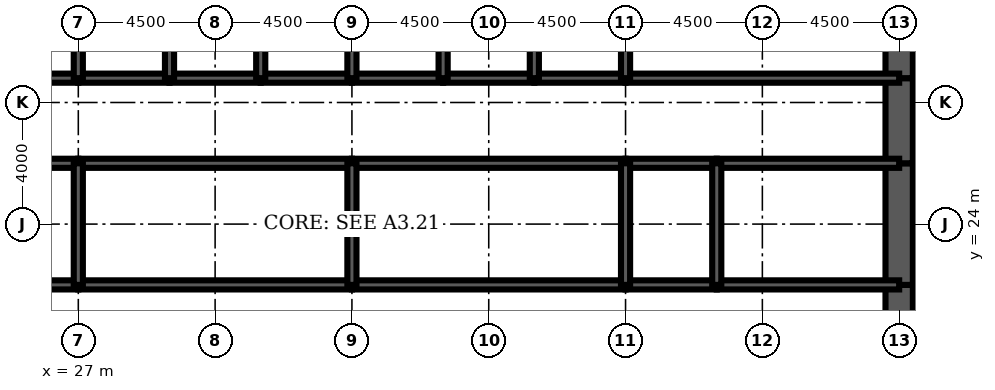
"""IFC4 building model, lengths in metres.
Left out: names, types, materials, properties, quantities, classifications, styles, units other than length and angle.
Written with IfcOpenShell. Run it as: python <this file> out.ifc"""

import sys

from ifc_helpers import new_model, si_unit, direction, frame, frame_2d, origin, place, context, subcontext, project, spatial, rectangle, extrude, element, fill, save


model = new_model("IFC4")
c1 = context("Model", 3, precision=1e-05, world=origin(), true_north=direction((0.0, 1.0)))
c2 = subcontext(c1, "Body", "Model", "MODEL_VIEW")
j1 = project(units=[si_unit("LENGTHUNIT", "METRE"), si_unit("PLANEANGLEUNIT", "RADIAN")], contexts=[c1])
p1 = place(None, origin())
s1 = spatial("IfcSite", under=j1, at=p1, CompositionType="ELEMENT")
p2 = place(p1, origin())
s2 = spatial("IfcBuilding", under=s1, at=p2, CompositionType="ELEMENT")
p3 = place(p2, frame((0.0, 0.0, 90.5)))
s3 = spatial("IfcBuildingStorey", under=s2, at=p3, CompositionType="ELEMENT", Elevation=90.5)
p4 = place(p3, frame((54.0, 19.2, 0.0), z_axis=(0.0, 0.0, 1.0), x_axis=(0.0, 1.0, 0.0)))
e1 = element("IfcWall", 1, at=p4, inside=s3, PredefinedType="SHEAR", context=c2, shape_type="SweptSolid", body=[
    extrude(rectangle(XDim=2.8, YDim=0.9, at=frame_2d((1.4, 0.0))), origin(), (0.0, 0.0, 1.0), 4.5),
])
p5 = place(p4, frame((0.4, 0.0, 0.0)))
e2 = element("IfcOpeningElement", 2, at=p5, cuts=e1, PredefinedType="OPENING", context=c2, shape_type="SweptSolid", body=[
    extrude(rectangle(XDim=1.8, YDim=2.1, at=frame_2d((0.9, 1.05))), frame((0.0, 0.46, 0.0), z_axis=(0.0, -1.0, 0.0), x_axis=(1.0, 0.0, 0.0)), (0.0, 0.0, 1.0), 0.92),
])
p6 = place(p3, frame((54.0, 22.0, 0.0), z_axis=(0.0, 0.0, 1.0), x_axis=(0.0, 1.0, 0.0)))
e3 = element("IfcWall", 3, at=p6, inside=s3, PredefinedType="SHEAR", context=c2, shape_type="SweptSolid", body=[
    extrude(rectangle(XDim=4.0, YDim=0.9, at=frame_2d((2.0, 0.0))), origin(), (0.0, 0.0, 1.0), 4.5),
])
p7 = place(p3, frame((54.0, 26.0, 0.0), z_axis=(0.0, 0.0, 1.0), x_axis=(0.0, 1.0, 0.0)))
e4 = element("IfcWall", 4, at=p7, inside=s3, PredefinedType="SHEAR", context=c2, shape_type="SweptSolid", body=[
    extrude(rectangle(XDim=2.8, YDim=0.9, at=frame_2d((1.4, 0.0))), origin(), (0.0, 0.0, 1.0), 4.5),
])
p8 = place(p7, frame((0.6, 0.0, 0.0)))
e5 = element("IfcOpeningElement", 5, at=p8, cuts=e4, PredefinedType="OPENING", context=c2, shape_type="SweptSolid", body=[
    extrude(rectangle(XDim=1.8, YDim=2.1, at=frame_2d((0.9, 1.05))), frame((0.0, 0.46, 0.0), z_axis=(0.0, -1.0, 0.0), x_axis=(1.0, 0.0, 0.0)), (0.0, 0.0, 1.0), 0.92),
])
p9 = place(p3, frame((54.0, 28.8, 0.0), z_axis=(0.0, 0.0, 1.0), x_axis=(0.0, 1.0, 0.0)))
e6 = element("IfcWall", 6, at=p9, inside=s3, PredefinedType="SHEAR", context=c2, shape_type="SweptSolid", body=[
    extrude(rectangle(XDim=3.2, YDim=0.9, at=frame_2d((1.6, 0.0))), origin(), (0.0, 0.0, 1.0), 4.5),
])
p10 = place(p3, frame((18.0, 28.8, 0.0), z_axis=(0.0, 0.0, 1.0), x_axis=(1.0, 0.0, 0.0)))
e7 = element("IfcWall", 7, at=p10, inside=s3, PredefinedType="SOLIDWALL", context=c2, shape_type="SweptSolid", body=[
    extrude(rectangle(XDim=9.0, YDim=0.3, at=frame_2d((4.5, 0.0))), origin(), (0.0, 0.0, 1.0), 4.5),
])
p11 = place(p10, frame((0.65, 0.0, 0.0)))
e8 = element("IfcOpeningElement", 8, at=p11, cuts=e7, PredefinedType="OPENING", context=c2, shape_type="SweptSolid", body=[
    extrude(rectangle(XDim=1.0, YDim=2.1, at=frame_2d((0.5, 1.05))), frame((0.0, 0.16, 0.0), z_axis=(0.0, -1.0, 0.0), x_axis=(1.0, 0.0, 0.0)), (0.0, 0.0, 1.0), 0.32),
])
p12 = place(p3, frame((27.0, 28.8, 0.0), z_axis=(0.0, 0.0, 1.0), x_axis=(1.0, 0.0, 0.0)))
e9 = element("IfcWall", 9, at=p12, inside=s3, PredefinedType="SOLIDWALL", context=c2, shape_type="SweptSolid", body=[
    extrude(rectangle(XDim=3.0, YDim=0.3, at=frame_2d((1.5, 0.0))), origin(), (0.0, 0.0, 1.0), 4.5),
])
p13 = place(p12, frame((0.95, 0.0, 0.0)))
e10 = element("IfcOpeningElement", 10, at=p13, cuts=e9, PredefinedType="OPENING", context=c2, shape_type="SweptSolid", body=[
    extrude(rectangle(XDim=1.1, YDim=2.2, at=frame_2d((0.55, 1.1))), frame((0.0, 0.16, 0.0), z_axis=(0.0, -1.0, 0.0), x_axis=(1.0, 0.0, 0.0)), (0.0, 0.0, 1.0), 0.32),
])
p14 = place(p3, frame((30.0, 28.8, 0.0), z_axis=(0.0, 0.0, 1.0), x_axis=(1.0, 0.0, 0.0)))
e11 = element("IfcWall", 11, at=p14, inside=s3, PredefinedType="SOLIDWALL", context=c2, shape_type="SweptSolid", body=[
    extrude(rectangle(XDim=3.0, YDim=0.3, at=frame_2d((1.5, 0.0))), origin(), (0.0, 0.0, 1.0), 4.5),
])
p15 = place(p14, frame((0.95, 0.0, 0.0)))
e12 = element("IfcOpeningElement", 12, at=p15, cuts=e11, PredefinedType="OPENING", context=c2, shape_type="SweptSolid", body=[
    extrude(rectangle(XDim=1.1, YDim=2.2, at=frame_2d((0.55, 1.1))), frame((0.0, 0.16, 0.0), z_axis=(0.0, -1.0, 0.0), x_axis=(1.0, 0.0, 0.0)), (0.0, 0.0, 1.0), 0.32),
])
p16 = place(p3, frame((33.0, 28.8, 0.0), z_axis=(0.0, 0.0, 1.0), x_axis=(1.0, 0.0, 0.0)))
e13 = element("IfcWall", 13, at=p16, inside=s3, PredefinedType="SOLIDWALL", context=c2, shape_type="SweptSolid", body=[
    extrude(rectangle(XDim=3.0, YDim=0.3, at=frame_2d((1.5, 0.0))), origin(), (0.0, 0.0, 1.0), 4.5),
])
p17 = place(p16, frame((0.95, 0.0, 0.0)))
e14 = element("IfcOpeningElement", 14, at=p17, cuts=e13, PredefinedType="OPENING", context=c2, shape_type="SweptSolid", body=[
    extrude(rectangle(XDim=1.1, YDim=2.2, at=frame_2d((0.55, 1.1))), frame((0.0, 0.16, 0.0), z_axis=(0.0, -1.0, 0.0), x_axis=(1.0, 0.0, 0.0)), (0.0, 0.0, 1.0), 0.32),
])
for number, where, z_axis, x_axis in (
    (15, (36.0, 28.8, 0.0), (0.0, 0.0, 1.0), (1.0, 0.0, 0.0)),
    (16, (39.0, 28.8, 0.0), (0.0, 0.0, 1.0), (1.0, 0.0, 0.0)),
):
    element("IfcWall", number, at=place(p3, frame(where, z_axis=z_axis, x_axis=x_axis)), inside=s3, PredefinedType="SOLIDWALL", context=c2, shape_type="SweptSolid", body=[
        extrude(rectangle(XDim=3.0, YDim=0.3, at=frame_2d((1.5, 0.0))), origin(), (0.0, 0.0, 1.0), 4.5),
    ])
p18 = place(p3, frame((42.0, 28.8, 0.0), z_axis=(0.0, 0.0, 1.0), x_axis=(1.0, 0.0, 0.0)))
e17 = element("IfcWall", 17, at=p18, inside=s3, PredefinedType="SOLIDWALL", context=c2, shape_type="SweptSolid", body=[
    extrude(rectangle(XDim=3.0, YDim=0.3, at=frame_2d((1.5, 0.0))), origin(), (0.0, 0.0, 1.0), 4.5),
])
p19 = place(p18, frame((0.95, 0.0, 0.0)))
e18 = element("IfcOpeningElement", 18, at=p19, cuts=e17, PredefinedType="OPENING", context=c2, shape_type="SweptSolid", body=[
    extrude(rectangle(XDim=1.1, YDim=2.2, at=frame_2d((0.55, 1.1))), frame((0.0, 0.16, 0.0), z_axis=(0.0, -1.0, 0.0), x_axis=(1.0, 0.0, 0.0)), (0.0, 0.0, 1.0), 0.32),
])
p20 = place(p3, frame((45.0, 28.8, 0.0), z_axis=(0.0, 0.0, 1.0), x_axis=(1.0, 0.0, 0.0)))
e19 = element("IfcWall", 19, at=p20, inside=s3, PredefinedType="SOLIDWALL", context=c2, shape_type="SweptSolid", body=[
    extrude(rectangle(XDim=9.0, YDim=0.3, at=frame_2d((4.5, 0.0))), origin(), (0.0, 0.0, 1.0), 4.5),
])
p21 = place(p20, frame((7.35, 0.0, 0.0)))
e20 = element("IfcOpeningElement", 20, at=p21, cuts=e19, PredefinedType="OPENING", context=c2, shape_type="SweptSolid", body=[
    extrude(rectangle(XDim=1.0, YDim=2.1, at=frame_2d((0.5, 1.05))), frame((0.0, 0.16, 0.0), z_axis=(0.0, -1.0, 0.0), x_axis=(1.0, 0.0, 0.0)), (0.0, 0.0, 1.0), 0.32),
])
p22 = place(p3, frame((24.0, 22.0, 0.0), z_axis=(0.0, 0.0, 1.0), x_axis=(1.0, 0.0, 0.0)))
e21 = element("IfcWall", 21, at=p22, inside=s3, PredefinedType="SOLIDWALL", context=c2, shape_type="SweptSolid", body=[
    extrude(rectangle(XDim=3.0, YDim=0.3, at=frame_2d((1.5, 0.0))), origin(), (0.0, 0.0, 1.0), 4.5),
])
p23 = place(p22, frame((1.0, 0.0, 0.0)))
e22 = element("IfcOpeningElement", 22, at=p23, cuts=e21, PredefinedType="OPENING", context=c2, shape_type="SweptSolid", body=[
    extrude(rectangle(XDim=1.0, YDim=2.1, at=frame_2d((0.5, 1.05))), frame((0.0, 0.16, 0.0), z_axis=(0.0, -1.0, 0.0), x_axis=(1.0, 0.0, 0.0)), (0.0, 0.0, 1.0), 0.32),
])
p24 = place(p3, frame((27.0, 22.0, 0.0), z_axis=(0.0, 0.0, 1.0), x_axis=(1.0, 0.0, 0.0)))
e23 = element("IfcWall", 23, at=p24, inside=s3, PredefinedType="SOLIDWALL", context=c2, shape_type="SweptSolid", body=[
    extrude(rectangle(XDim=9.0, YDim=0.3, at=frame_2d((4.5, 0.0))), origin(), (0.0, 0.0, 1.0), 4.5),
])
p25 = place(p24, frame((4.0, 0.0, 0.0)))
e24 = element("IfcOpeningElement", 24, at=p25, cuts=e23, PredefinedType="OPENING", context=c2, shape_type="SweptSolid", body=[
    extrude(rectangle(XDim=1.0, YDim=2.1, at=frame_2d((0.5, 1.05))), frame((0.0, 0.16, 0.0), z_axis=(0.0, -1.0, 0.0), x_axis=(1.0, 0.0, 0.0)), (0.0, 0.0, 1.0), 0.32),
])
p26 = place(p3, frame((36.0, 22.0, 0.0), z_axis=(0.0, 0.0, 1.0), x_axis=(1.0, 0.0, 0.0)))
e25 = element("IfcWall", 25, at=p26, inside=s3, PredefinedType="SOLIDWALL", context=c2, shape_type="SweptSolid", body=[
    extrude(rectangle(XDim=9.0, YDim=0.3, at=frame_2d((4.5, 0.0))), origin(), (0.0, 0.0, 1.0), 4.5),
])
p27 = place(p26, frame((4.0, 0.0, 0.0)))
e26 = element("IfcOpeningElement", 26, at=p27, cuts=e25, PredefinedType="OPENING", context=c2, shape_type="SweptSolid", body=[
    extrude(rectangle(XDim=1.0, YDim=2.1, at=frame_2d((0.5, 1.05))), frame((0.0, 0.16, 0.0), z_axis=(0.0, -1.0, 0.0), x_axis=(1.0, 0.0, 0.0)), (0.0, 0.0, 1.0), 0.32),
])
p28 = place(p3, frame((45.0, 22.0, 0.0), z_axis=(0.0, 0.0, 1.0), x_axis=(1.0, 0.0, 0.0)))
e27 = element("IfcWall", 27, at=p28, inside=s3, PredefinedType="SOLIDWALL", context=c2, shape_type="SweptSolid", body=[
    extrude(rectangle(XDim=3.0, YDim=0.3, at=frame_2d((1.5, 0.0))), origin(), (0.0, 0.0, 1.0), 4.5),
])
p29 = place(p28, frame((1.0, 0.0, 0.0)))
e28 = element("IfcOpeningElement", 28, at=p29, cuts=e27, PredefinedType="OPENING", context=c2, shape_type="SweptSolid", body=[
    extrude(rectangle(XDim=1.0, YDim=2.1, at=frame_2d((0.5, 1.05))), frame((0.0, 0.16, 0.0), z_axis=(0.0, -1.0, 0.0), x_axis=(1.0, 0.0, 0.0)), (0.0, 0.0, 1.0), 0.32),
])
p30 = place(p3, frame((48.0, 22.0, 0.0), z_axis=(0.0, 0.0, 1.0), x_axis=(1.0, 0.0, 0.0)))
e29 = element("IfcWall", 29, at=p30, inside=s3, PredefinedType="SOLIDWALL", context=c2, shape_type="SweptSolid", body=[
    extrude(rectangle(XDim=6.0, YDim=0.3, at=frame_2d((3.0, 0.0))), origin(), (0.0, 0.0, 1.0), 4.5),
])
p31 = place(p30, frame((2.0, 0.0, 0.0)))
e30 = element("IfcOpeningElement", 30, at=p31, cuts=e29, PredefinedType="OPENING", context=c2, shape_type="SweptSolid", body=[
    extrude(rectangle(XDim=1.0, YDim=2.1, at=frame_2d((0.5, 1.05))), frame((0.0, 0.16, 0.0), z_axis=(0.0, -1.0, 0.0), x_axis=(1.0, 0.0, 0.0)), (0.0, 0.0, 1.0), 0.32),
])
p32 = place(p30, frame((4.0, 0.0, 0.0)))
e31 = element("IfcOpeningElement", 31, at=p32, cuts=e29, PredefinedType="OPENING", context=c2, shape_type="SweptSolid", body=[
    extrude(rectangle(XDim=1.0, YDim=2.1, at=frame_2d((0.5, 1.05))), frame((0.0, 0.16, 0.0), z_axis=(0.0, -1.0, 0.0), x_axis=(1.0, 0.0, 0.0)), (0.0, 0.0, 1.0), 0.32),
])
p33 = place(p3, frame((24.0, 26.0, 0.0), z_axis=(0.0, 0.0, 1.0), x_axis=(1.0, 0.0, 0.0)))
e32 = element("IfcWall", 32, at=p33, inside=s3, PredefinedType="SOLIDWALL", context=c2, shape_type="SweptSolid", body=[
    extrude(rectangle(XDim=3.0, YDim=0.3, at=frame_2d((1.5, 0.0))), origin(), (0.0, 0.0, 1.0), 4.5),
])
for number, where, z_axis, x_axis in (
    (33, (27.0, 26.0, 0.0), (0.0, 0.0, 1.0), (1.0, 0.0, 0.0)),
    (34, (36.0, 26.0, 0.0), (0.0, 0.0, 1.0), (1.0, 0.0, 0.0)),
):
    element("IfcWall", number, at=place(p3, frame(where, z_axis=z_axis, x_axis=x_axis)), inside=s3, PredefinedType="SOLIDWALL", context=c2, shape_type="SweptSolid", body=[
        extrude(rectangle(XDim=9.0, YDim=0.3, at=frame_2d((4.5, 0.0))), origin(), (0.0, 0.0, 1.0), 4.5),
    ])
p34 = place(p3, frame((45.0, 26.0, 0.0), z_axis=(0.0, 0.0, 1.0), x_axis=(1.0, 0.0, 0.0)))
e35 = element("IfcWall", 35, at=p34, inside=s3, PredefinedType="SOLIDWALL", context=c2, shape_type="SweptSolid", body=[
    extrude(rectangle(XDim=3.0, YDim=0.3, at=frame_2d((1.5, 0.0))), origin(), (0.0, 0.0, 1.0), 4.5),
])
p35 = place(p3, frame((48.0, 26.0, 0.0), z_axis=(0.0, 0.0, 1.0), x_axis=(1.0, 0.0, 0.0)))
e36 = element("IfcWall", 36, at=p35, inside=s3, PredefinedType="SOLIDWALL", context=c2, shape_type="SweptSolid", body=[
    extrude(rectangle(XDim=6.0, YDim=0.3, at=frame_2d((3.0, 0.0))), origin(), (0.0, 0.0, 1.0), 4.5),
])
for number, where, z_axis, x_axis in (
    (37, (27.0, 28.8, 0.0), (0.0, 0.0, 1.0), (0.0, 1.0, 0.0)),
    (38, (30.0, 28.8, 0.0), (0.0, 0.0, 1.0), (0.0, 1.0, 0.0)),
    (39, (33.0, 28.8, 0.0), (0.0, 0.0, 1.0), (0.0, 1.0, 0.0)),
    (40, (36.0, 28.8, 0.0), (0.0, 0.0, 1.0), (0.0, 1.0, 0.0)),
    (41, (39.0, 28.8, 0.0), (0.0, 0.0, 1.0), (0.0, 1.0, 0.0)),
    (42, (42.0, 28.8, 0.0), (0.0, 0.0, 1.0), (0.0, 1.0, 0.0)),
    (43, (45.0, 28.8, 0.0), (0.0, 0.0, 1.0), (0.0, 1.0, 0.0)),
):
    element("IfcWall", number, at=place(p3, frame(where, z_axis=z_axis, x_axis=x_axis)), inside=s3, PredefinedType="SOLIDWALL", context=c2, shape_type="SweptSolid", body=[
        extrude(rectangle(XDim=3.2, YDim=0.3, at=frame_2d((1.6, 0.0))), origin(), (0.0, 0.0, 1.0), 4.5),
    ])
for number, where, z_axis, x_axis in (
    (44, (27.0, 22.0, 0.0), (0.0, 0.0, 1.0), (0.0, 1.0, 0.0)),
    (45, (36.0, 22.0, 0.0), (0.0, 0.0, 1.0), (0.0, 1.0, 0.0)),
    (46, (45.0, 22.0, 0.0), (0.0, 0.0, 1.0), (0.0, 1.0, 0.0)),
    (47, (48.0, 22.0, 0.0), (0.0, 0.0, 1.0), (0.0, 1.0, 0.0)),
):
    element("IfcWall", number, at=place(p3, frame(where, z_axis=z_axis, x_axis=x_axis)), inside=s3, PredefinedType="SOLIDWALL", context=c2, shape_type="SweptSolid", body=[
        extrude(rectangle(XDim=4.0, YDim=0.3, at=frame_2d((2.0, 0.0))), origin(), (0.0, 0.0, 1.0), 4.5),
    ])
p36 = place(p3, frame((38.5, 22.15, 0.0), z_axis=(0.0, 0.0, 1.0), x_axis=(0.0, 1.0, 0.0)))
e48 = element("IfcWall", 48, at=p36, inside=s3, PredefinedType="PARTITIONING", context=c2, shape_type="SweptSolid", body=[
    extrude(rectangle(XDim=3.7, YDim=0.15, at=frame_2d((1.85, 0.0))), origin(), (0.0, 0.0, 1.0), 3.0),
])
p37 = place(p36, frame((2.2, 0.0, 0.0)))
e49 = element("IfcOpeningElement", 49, at=p37, cuts=e48, PredefinedType="OPENING", context=c2, shape_type="SweptSolid", body=[
    extrude(rectangle(XDim=1.0, YDim=2.1, at=frame_2d((0.5, 1.05))), frame((0.0, 0.085, 0.0), z_axis=(0.0, -1.0, 0.0), x_axis=(1.0, 0.0, 0.0)), (0.0, 0.0, 1.0), 0.17),
])
p38 = place(p3, frame((51.375, 22.15, 0.0), z_axis=(0.0, 0.0, 1.0), x_axis=(0.0, 1.0, 0.0)))
e50 = element("IfcWall", 50, at=p38, inside=s3, PredefinedType="PARTITIONING", context=c2, shape_type="SweptSolid", body=[
    extrude(rectangle(XDim=3.7, YDim=0.15, at=frame_2d((1.85, 0.0))), origin(), (0.0, 0.0, 1.0), 3.0),
])
p39 = place(p3, frame((47.7, 26.15, 0.0), z_axis=(0.0, 0.0, 1.0), x_axis=(0.0, 1.0, 0.0)))
e51 = element("IfcWall", 51, at=p39, inside=s3, PredefinedType="PARTITIONING", context=c2, shape_type="SweptSolid", body=[
    extrude(rectangle(XDim=2.5, YDim=0.15, at=frame_2d((1.25, 0.0))), origin(), (0.0, 0.0, 1.0), 3.0),
])
p40 = place(p39, frame((1.15, 0.0, 0.0)))
e52 = element("IfcOpeningElement", 52, at=p40, cuts=e51, PredefinedType="OPENING", context=c2, shape_type="SweptSolid", body=[
    extrude(rectangle(XDim=1.0, YDim=2.1, at=frame_2d((0.5, 1.05))), frame((0.0, 0.085, 0.0), z_axis=(0.0, -1.0, 0.0), x_axis=(1.0, 0.0, 0.0)), (0.0, 0.0, 1.0), 0.17),
])
p41 = place(p37, origin())
e53 = element("IfcDoor", 53, at=p41, inside=s3, OperationType="SINGLE_SWING_RIGHT", PredefinedType="DOOR", context=c2, shape_type="SweptSolid", body=[
    extrude(rectangle(XDim=1.0, YDim=2.1, at=frame_2d((0.5, 1.05))), frame((0.0, 0.025, 0.0), z_axis=(0.0, -1.0, 0.0), x_axis=(1.0, 0.0, 0.0)), (0.0, 0.0, 1.0), 0.05),
])
fill(e49, e53)
p42 = place(p40, origin())
e54 = element("IfcDoor", 54, at=p42, inside=s3, OperationType="SINGLE_SWING_RIGHT", PredefinedType="DOOR", context=c2, shape_type="SweptSolid", body=[
    extrude(rectangle(XDim=1.0, YDim=2.1, at=frame_2d((0.5, 1.05))), frame((0.0, 0.025, 0.0), z_axis=(0.0, -1.0, 0.0), x_axis=(1.0, 0.0, 0.0)), (0.0, 0.0, 1.0), 0.05),
])
fill(e52, e54)
p43 = place(p19, origin())
e55 = element("IfcDoor", 55, at=p43, inside=s3, OperationType="DOUBLE_DOOR_SLIDING", PredefinedType="USERDEFINED", context=c2, shape_type="SweptSolid", body=[
    extrude(rectangle(XDim=1.1, YDim=2.2, at=frame_2d((0.55, 1.1))), frame((0.0, 0.025, 0.0), z_axis=(0.0, -1.0, 0.0), x_axis=(1.0, 0.0, 0.0)), (0.0, 0.0, 1.0), 0.05),
])
fill(e18, e55)
p44 = place(p13, origin())
e56 = element("IfcDoor", 56, at=p44, inside=s3, OperationType="DOUBLE_DOOR_SLIDING", PredefinedType="USERDEFINED", context=c2, shape_type="SweptSolid", body=[
    extrude(rectangle(XDim=1.1, YDim=2.2, at=frame_2d((0.55, 1.1))), frame((0.0, 0.025, 0.0), z_axis=(0.0, -1.0, 0.0), x_axis=(1.0, 0.0, 0.0)), (0.0, 0.0, 1.0), 0.05),
])
fill(e10, e56)
p45 = place(p15, origin())
e57 = element("IfcDoor", 57, at=p45, inside=s3, OperationType="DOUBLE_DOOR_SLIDING", PredefinedType="USERDEFINED", context=c2, shape_type="SweptSolid", body=[
    extrude(rectangle(XDim=1.1, YDim=2.2, at=frame_2d((0.55, 1.1))), frame((0.0, 0.025, 0.0), z_axis=(0.0, -1.0, 0.0), x_axis=(1.0, 0.0, 0.0)), (0.0, 0.0, 1.0), 0.05),
])
fill(e12, e57)
p46 = place(p17, origin())
e58 = element("IfcDoor", 58, at=p46, inside=s3, OperationType="DOUBLE_DOOR_SLIDING", PredefinedType="USERDEFINED", context=c2, shape_type="SweptSolid", body=[
    extrude(rectangle(XDim=1.1, YDim=2.2, at=frame_2d((0.55, 1.1))), frame((0.0, 0.025, 0.0), z_axis=(0.0, -1.0, 0.0), x_axis=(1.0, 0.0, 0.0)), (0.0, 0.0, 1.0), 0.05),
])
fill(e14, e58)
p47 = place(p21, origin())
e59 = element("IfcDoor", 59, at=p47, inside=s3, OperationType="SINGLE_SWING_RIGHT", PredefinedType="DOOR", context=c2, shape_type="SweptSolid", body=[
    extrude(rectangle(XDim=1.0, YDim=2.1, at=frame_2d((0.5, 1.05))), frame((0.0, 0.025, 0.0), z_axis=(0.0, -1.0, 0.0), x_axis=(1.0, 0.0, 0.0)), (0.0, 0.0, 1.0), 0.05),
])
fill(e20, e59)
p48 = place(p5, origin())
e60 = element("IfcDoor", 60, at=p48, inside=s3, OperationType="SINGLE_SWING_LEFT", PredefinedType="DOOR", context=c2, shape_type="SweptSolid", body=[
    extrude(rectangle(XDim=1.8, YDim=2.1, at=frame_2d((0.9, 1.05))), frame((0.0, 0.45, 0.0), z_axis=(0.0, -1.0, 0.0), x_axis=(1.0, 0.0, 0.0)), (0.0, 0.0, 1.0), 0.899),
])
fill(e2, e60)
p49 = place(p8, origin())
e61 = element("IfcDoor", 61, at=p49, inside=s3, OperationType="SINGLE_SWING_LEFT", PredefinedType="DOOR", context=c2, shape_type="SweptSolid", body=[
    extrude(rectangle(XDim=1.8, YDim=2.1, at=frame_2d((0.9, 1.05))), frame((0.0, 0.45, 0.0), z_axis=(0.0, -1.0, 0.0), x_axis=(1.0, 0.0, 0.0)), (0.0, 0.0, 1.0), 0.899),
])
fill(e5, e61)
p50 = place(p25, origin())
e62 = element("IfcDoor", 62, at=p50, inside=s3, OperationType="SINGLE_SWING_LEFT", PredefinedType="DOOR", context=c2, shape_type="SweptSolid", body=[
    extrude(rectangle(XDim=1.0, YDim=2.1, at=frame_2d((0.5, 1.05))), frame((0.0, 0.025, 0.0), z_axis=(0.0, -1.0, 0.0), x_axis=(1.0, 0.0, 0.0)), (0.0, 0.0, 1.0), 0.05),
])
fill(e24, e62)
p51 = place(p27, origin())
e63 = element("IfcDoor", 63, at=p51, inside=s3, OperationType="SINGLE_SWING_LEFT", PredefinedType="DOOR", context=c2, shape_type="SweptSolid", body=[
    extrude(rectangle(XDim=1.0, YDim=2.1, at=frame_2d((0.5, 1.05))), frame((0.0, 0.025, 0.0), z_axis=(0.0, -1.0, 0.0), x_axis=(1.0, 0.0, 0.0)), (0.0, 0.0, 1.0), 0.05),
])
fill(e26, e63)
p52 = place(p29, origin())
e64 = element("IfcDoor", 64, at=p52, inside=s3, OperationType="SINGLE_SWING_LEFT", PredefinedType="DOOR", context=c2, shape_type="SweptSolid", body=[
    extrude(rectangle(XDim=1.0, YDim=2.1, at=frame_2d((0.5, 1.05))), frame((0.0, 0.025, 0.0), z_axis=(0.0, -1.0, 0.0), x_axis=(1.0, 0.0, 0.0)), (0.0, 0.0, 1.0), 0.05),
])
fill(e28, e64)
p53 = place(p31, origin())
e65 = element("IfcDoor", 65, at=p53, inside=s3, OperationType="SINGLE_SWING_LEFT", PredefinedType="DOOR", context=c2, shape_type="SweptSolid", body=[
    extrude(rectangle(XDim=1.0, YDim=2.1, at=frame_2d((0.5, 1.05))), frame((0.0, 0.025, 0.0), z_axis=(0.0, -1.0, 0.0), x_axis=(1.0, 0.0, 0.0)), (0.0, 0.0, 1.0), 0.05),
])
fill(e30, e65)
p54 = place(p32, origin())
e66 = element("IfcDoor", 66, at=p54, inside=s3, OperationType="SINGLE_SWING_RIGHT", PredefinedType="DOOR", context=c2, shape_type="SweptSolid", body=[
    extrude(rectangle(XDim=1.0, YDim=2.1, at=frame_2d((0.5, 1.05))), frame((0.0, 0.025, 0.0), z_axis=(0.0, -1.0, 0.0), x_axis=(1.0, 0.0, 0.0)), (0.0, 0.0, 1.0), 0.05),
])
fill(e31, e66)
save(model, sys.argv[1])
